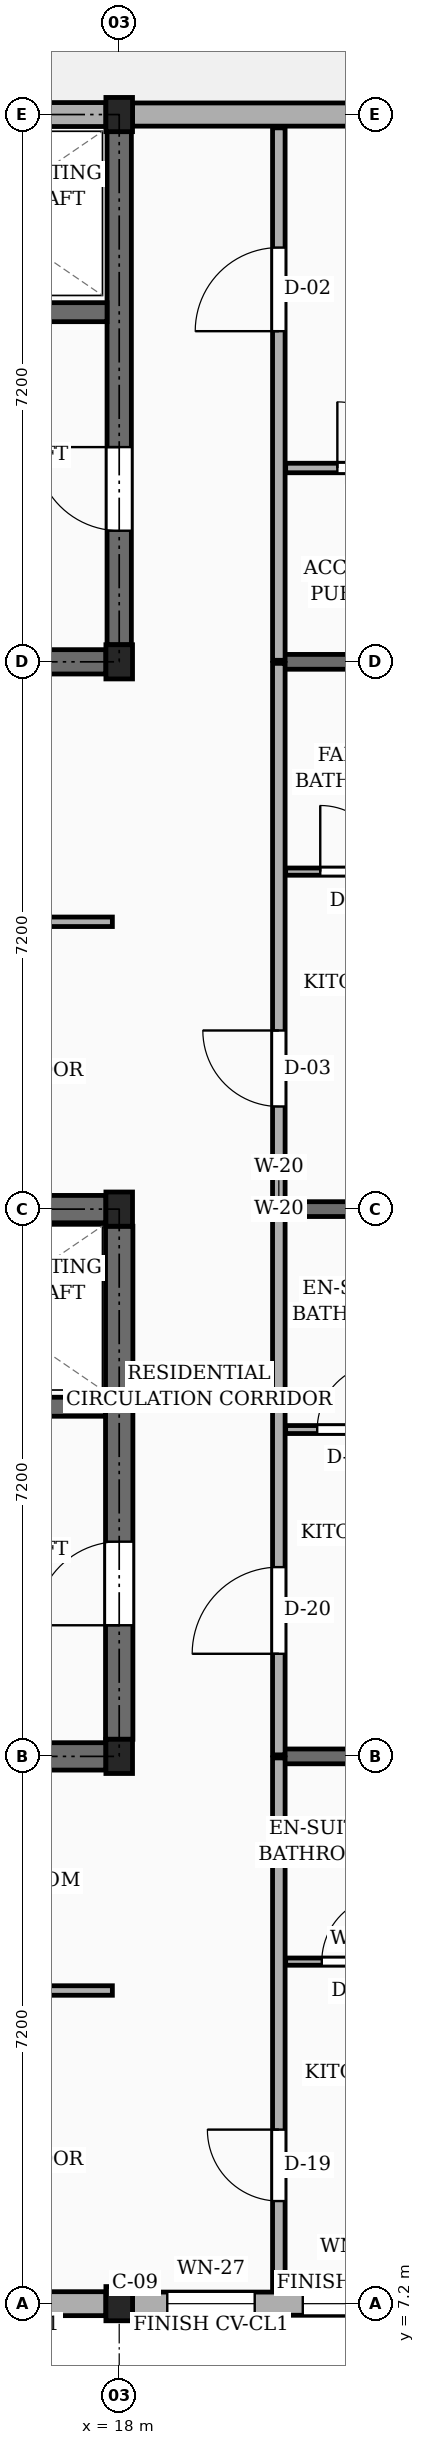
"""IFC4 building model, lengths in metres.
Left out: names, types, materials, properties, quantities, classifications, styles, units other than length and angle.
Written with IfcOpenShell. Run it as: python <this file> out.ifc"""

import sys

from ifc_helpers import new_model, si_unit, direction, frame, frame_2d, origin, origin_2d, place, context, subcontext, project, spatial, rectangle, extrude, element, fill, save


model = new_model("IFC4")
c1 = context("Model", 3, precision=1e-05, world=origin(), true_north=direction((0.0, 1.0)))
c2 = subcontext(c1, "Body", "Model", "MODEL_VIEW")
j1 = project(units=[si_unit("LENGTHUNIT", "METRE"), si_unit("PLANEANGLEUNIT", "RADIAN")], contexts=[c1])
p1 = place(None, origin())
s1 = spatial("IfcSite", under=j1, at=p1, CompositionType="ELEMENT")
p2 = place(p1, origin())
s2 = spatial("IfcBuilding", under=s1, at=p2, CompositionType="ELEMENT")
p3 = place(p2, frame((0.0, 0.0, 45.45)))
s3 = spatial("IfcBuildingStorey", under=s2, at=p3, CompositionType="ELEMENT", Elevation=45.45)
for number, where, z_axis, x_axis in (
    (1, (18.0, 7.2, 0.0), (0.0, 0.0, 1.0), (1.0, 0.0, 0.0)),
    (2, (18.0, 14.4, 0.0), (0.0, 0.0, 1.0), (1.0, 0.0, 0.0)),
    (3, (18.0, 21.6, 0.0), (0.0, 0.0, 1.0), (1.0, 0.0, 0.0)),
    (4, (18.0, 28.8, 0.0), (0.0, 0.0, 1.0), (1.0, 0.0, 0.0)),
    (5, (18.0, 36.0, 0.0), (0.0, 0.0, 1.0), (1.0, 0.0, 0.0)),
):
    element("IfcColumn", number, at=place(p3, frame(where, z_axis=z_axis, x_axis=x_axis)), inside=s3, PredefinedType="COLUMN", context=c2, shape_type="SweptSolid", body=[
        extrude(rectangle(XDim=0.35, YDim=0.45, at=origin_2d()), origin(), (0.0, 0.0, 1.0), 3.15),
    ])
for number, where, z_axis, x_axis in (
    (6, (20.1, 14.4, 0.0), (0.0, 0.0, 1.0), (1.0, 0.0, 0.0)),
    (7, (20.1, 21.6, 0.0), (0.0, 0.0, 1.0), (1.0, 0.0, 0.0)),
    (8, (20.1, 28.8, 0.0), (0.0, 0.0, 1.0), (1.0, 0.0, 0.0)),
):
    element("IfcWall", number, at=place(p3, frame(where, z_axis=z_axis, x_axis=x_axis)), inside=s3, PredefinedType="SOLIDWALL", context=c2, shape_type="SweptSolid", body=[
        extrude(rectangle(XDim=4.925, YDim=0.195, at=frame_2d((2.462, 0.0))), origin(), (0.0, 0.0, 1.0), 2.17),
    ])
p4 = place(p3, frame((10.975, 7.2, 0.0), z_axis=(0.0, 0.0, 1.0), x_axis=(1.0, 0.0, 0.0)))
e9 = element("IfcWall", 9, at=p4, inside=s3, PredefinedType="SOLIDWALL", context=c2, shape_type="SweptSolid", body=[
    extrude(rectangle(XDim=6.85, YDim=0.315, at=frame_2d((3.425, 0.0))), origin(), (0.0, 0.0, 1.0), 2.44),
])
p5 = place(p4, frame((0.45, 0.0, 0.78)))
e10 = element("IfcOpeningElement", 10, at=p5, cuts=e9, PredefinedType="OPENING", context=c2, shape_type="SweptSolid", body=[
    extrude(rectangle(XDim=0.94, YDim=1.44, at=frame_2d((0.47, 0.72))), frame((0.0, 0.167, 0.0), z_axis=(0.0, -1.0, 0.0), x_axis=(1.0, 0.0, 0.0)), (0.0, 0.0, 1.0), 0.335),
])
p6 = place(p4, frame((4.65, 0.0, 0.78)))
e11 = element("IfcOpeningElement", 11, at=p6, cuts=e9, PredefinedType="OPENING", context=c2, shape_type="SweptSolid", body=[
    extrude(rectangle(XDim=1.15, YDim=1.44, at=frame_2d((0.575, 0.72))), frame((0.0, 0.167, 0.0), z_axis=(0.0, -1.0, 0.0), x_axis=(1.0, 0.0, 0.0)), (0.0, 0.0, 1.0), 0.335),
])
p7 = place(p3, frame((18.175, 7.2, 0.0), z_axis=(0.0, 0.0, 1.0), x_axis=(1.0, 0.0, 0.0)))
e12 = element("IfcWall", 12, at=p7, inside=s3, PredefinedType="SOLIDWALL", context=c2, shape_type="SweptSolid", body=[
    extrude(rectangle(XDim=6.85, YDim=0.305, at=frame_2d((3.425, 0.0))), origin(), (0.0, 0.0, 1.0), 2.44),
])
p8 = place(p7, frame((0.458, 0.0, 0.78)))
e13 = element("IfcOpeningElement", 13, at=p8, cuts=e12, PredefinedType="OPENING", context=c2, shape_type="SweptSolid", body=[
    extrude(rectangle(XDim=1.15, YDim=1.44, at=frame_2d((0.575, 0.72))), frame((0.0, 0.163, 0.0), z_axis=(0.0, -1.0, 0.0), x_axis=(1.0, 0.0, 0.0)), (0.0, 0.0, 1.0), 0.325),
])
p9 = place(p7, frame((2.24, 0.0, 0.78)))
e14 = element("IfcOpeningElement", 14, at=p9, cuts=e12, PredefinedType="OPENING", context=c2, shape_type="SweptSolid", body=[
    extrude(rectangle(XDim=1.35, YDim=1.44, at=frame_2d((0.675, 0.72))), frame((0.0, 0.163, 0.0), z_axis=(0.0, -1.0, 0.0), x_axis=(1.0, 0.0, 0.0)), (0.0, 0.0, 1.0), 0.325),
])
p10 = place(p7, frame((4.883, 0.0, 0.78)))
e15 = element("IfcOpeningElement", 15, at=p10, cuts=e12, PredefinedType="OPENING", context=c2, shape_type="SweptSolid", body=[
    extrude(rectangle(XDim=0.85, YDim=1.15, at=frame_2d((0.425, 0.575))), frame((0.0, 0.163, 0.0), z_axis=(0.0, -1.0, 0.0), x_axis=(1.0, 0.0, 0.0)), (0.0, 0.0, 1.0), 0.325),
])
p11 = place(p3, frame((25.025, 36.0, 0.0), z_axis=(0.0, 0.0, 1.0), x_axis=(-1.0, 0.0, 0.0)))
e16 = element("IfcWall", 16, at=p11, inside=s3, PredefinedType="SOLIDWALL", context=c2, shape_type="SweptSolid", body=[
    extrude(rectangle(XDim=6.85, YDim=0.305, at=frame_2d((3.425, 0.0))), origin(), (0.0, 0.0, 1.0), 2.44),
])
p12 = place(p11, frame((2.8, 0.0, 0.0)))
e17 = element("IfcOpeningElement", 17, at=p12, cuts=e16, PredefinedType="OPENING", context=c2, shape_type="SweptSolid", body=[
    extrude(rectangle(XDim=1.2, YDim=2.12, at=frame_2d((0.6, 1.06))), frame((0.0, 0.163, 0.0), z_axis=(0.0, -1.0, 0.0), x_axis=(1.0, 0.0, 0.0)), (0.0, 0.0, 1.0), 0.325),
])
p13 = place(p11, frame((0.65, 0.0, 0.78)))
e18 = element("IfcOpeningElement", 18, at=p13, cuts=e16, PredefinedType="OPENING", context=c2, shape_type="SweptSolid", body=[
    extrude(rectangle(XDim=1.16, YDim=1.15, at=frame_2d((0.58, 0.575))), frame((0.0, 0.163, 0.0), z_axis=(0.0, -1.0, 0.0), x_axis=(1.0, 0.0, 0.0)), (0.0, 0.0, 1.0), 0.325),
])
p14 = place(p3, frame((17.825, 36.0, 0.0), z_axis=(0.0, 0.0, 1.0), x_axis=(-1.0, 0.0, 0.0)))
e19 = element("IfcWall", 19, at=p14, inside=s3, PredefinedType="SOLIDWALL", context=c2, shape_type="SweptSolid", body=[
    extrude(rectangle(XDim=6.85, YDim=0.315, at=frame_2d((3.425, 0.0))), origin(), (0.0, 0.0, 1.0), 2.44),
])
p15 = place(p14, frame((3.0, 0.0, 0.9)))
e20 = element("IfcOpeningElement", 20, at=p15, cuts=e19, PredefinedType="OPENING", context=c2, shape_type="SweptSolid", body=[
    extrude(rectangle(XDim=0.85, YDim=1.15, at=frame_2d((0.425, 0.575))), frame((0.0, 0.167, 0.0), z_axis=(0.0, -1.0, 0.0), x_axis=(1.0, 0.0, 0.0)), (0.0, 0.0, 1.0), 0.335),
])
p16 = place(p3, frame((10.975, 21.6, 0.0), z_axis=(0.0, 0.0, 1.0), x_axis=(1.0, 0.0, 0.0)))
e21 = element("IfcWall", 21, at=p16, inside=s3, PredefinedType="SHEAR", context=c2, shape_type="SweptSolid", body=[
    extrude(rectangle(XDim=6.85, YDim=0.36, at=frame_2d((3.425, 0.0))), origin(), (0.0, 0.0, 1.0), 2.87),
])
p17 = place(p3, frame((18.0, 14.625, 0.0), z_axis=(0.0, 0.0, 1.0), x_axis=(0.0, 1.0, 0.0)))
e22 = element("IfcWall", 22, at=p17, inside=s3, PredefinedType="SHEAR", context=c2, shape_type="SweptSolid", body=[
    extrude(rectangle(XDim=6.75, YDim=0.36, at=frame_2d((3.375, 0.0))), origin(), (0.0, 0.0, 1.0), 2.87),
])
p18 = place(p17, frame((1.5, 0.0, 0.0)))
e23 = element("IfcOpeningElement", 23, at=p18, cuts=e22, PredefinedType="OPENING", context=c2, shape_type="SweptSolid", body=[
    extrude(rectangle(XDim=1.1, YDim=2.15, at=frame_2d((0.55, 1.075))), frame((0.0, 0.19, 0.0), z_axis=(0.0, -1.0, 0.0), x_axis=(1.0, 0.0, 0.0)), (0.0, 0.0, 1.0), 0.38),
])
p19 = place(p3, frame((10.975, 14.4, 0.0), z_axis=(0.0, 0.0, 1.0), x_axis=(1.0, 0.0, 0.0)))
e24 = element("IfcWall", 24, at=p19, inside=s3, PredefinedType="SHEAR", context=c2, shape_type="SweptSolid", body=[
    extrude(rectangle(XDim=6.85, YDim=0.36, at=frame_2d((3.425, 0.0))), origin(), (0.0, 0.0, 1.0), 2.87),
])
p20 = place(p3, frame((14.525, 19.0, 0.0), z_axis=(0.0, 0.0, 1.0), x_axis=(1.0, 0.0, 0.0)))
e25 = element("IfcWall", 25, at=p20, inside=s3, PredefinedType="SHEAR", context=c2, shape_type="SweptSolid", body=[
    extrude(rectangle(XDim=3.295, YDim=0.25, at=frame_2d((1.647, 0.0))), origin(), (0.0, 0.0, 1.0), 2.87),
])
p21 = place(p20, frame((1.1, 0.0, 0.0)))
e26 = element("IfcOpeningElement", 26, at=p21, cuts=e25, PredefinedType="OPENING", context=c2, shape_type="SweptSolid", body=[
    extrude(rectangle(XDim=1.1, YDim=2.2, at=frame_2d((0.55, 1.1))), frame((0.0, 0.135, 0.0), z_axis=(0.0, -1.0, 0.0), x_axis=(1.0, 0.0, 0.0)), (0.0, 0.0, 1.0), 0.27),
])
p22 = place(p3, frame((18.0, 29.025, 0.0), z_axis=(0.0, 0.0, 1.0), x_axis=(0.0, 1.0, 0.0)))
e27 = element("IfcWall", 27, at=p22, inside=s3, PredefinedType="SHEAR", context=c2, shape_type="SweptSolid", body=[
    extrude(rectangle(XDim=6.75, YDim=0.32, at=frame_2d((3.375, 0.0))), origin(), (0.0, 0.0, 1.0), 2.87),
])
p23 = place(p22, frame((1.5, 0.0, 0.0)))
e28 = element("IfcOpeningElement", 28, at=p23, cuts=e27, PredefinedType="OPENING", context=c2, shape_type="SweptSolid", body=[
    extrude(rectangle(XDim=1.1, YDim=2.15, at=frame_2d((0.55, 1.075))), frame((0.0, 0.17, 0.0), z_axis=(0.0, -1.0, 0.0), x_axis=(1.0, 0.0, 0.0)), (0.0, 0.0, 1.0), 0.34),
])
p24 = place(p3, frame((10.975, 28.8, 0.0), z_axis=(0.0, 0.0, 1.0), x_axis=(1.0, 0.0, 0.0)))
e29 = element("IfcWall", 29, at=p24, inside=s3, PredefinedType="SHEAR", context=c2, shape_type="SweptSolid", body=[
    extrude(rectangle(XDim=6.85, YDim=0.32, at=frame_2d((3.425, 0.0))), origin(), (0.0, 0.0, 1.0), 2.87),
])
p25 = place(p3, frame((14.525, 33.4, 0.0), z_axis=(0.0, 0.0, 1.0), x_axis=(1.0, 0.0, 0.0)))
e30 = element("IfcWall", 30, at=p25, inside=s3, PredefinedType="SHEAR", context=c2, shape_type="SweptSolid", body=[
    extrude(rectangle(XDim=3.315, YDim=0.25, at=frame_2d((1.658, 0.0))), origin(), (0.0, 0.0, 1.0), 2.87),
])
p26 = place(p25, frame((1.1, 0.0, 0.0)))
e31 = element("IfcOpeningElement", 31, at=p26, cuts=e30, PredefinedType="OPENING", context=c2, shape_type="SweptSolid", body=[
    extrude(rectangle(XDim=1.1, YDim=2.2, at=frame_2d((0.55, 1.1))), frame((0.0, 0.135, 0.0), z_axis=(0.0, -1.0, 0.0), x_axis=(1.0, 0.0, 0.0)), (0.0, 0.0, 1.0), 0.27),
])
p27 = place(p3, frame((20.1, 7.375, 0.0), z_axis=(0.0, 0.0, 1.0), x_axis=(0.0, 1.0, 0.0)))
e32 = element("IfcWall", 32, at=p27, inside=s3, PredefinedType="PARTITIONING", context=c2, shape_type="SweptSolid", body=[
    extrude(rectangle(XDim=7.005, YDim=0.165, at=frame_2d((3.502, 0.0))), origin(), (0.0, 0.0, 1.0), 2.305),
])
p28 = place(p27, frame((1.175, 0.0, 0.0)))
e33 = element("IfcOpeningElement", 33, at=p28, cuts=e32, PredefinedType="OPENING", context=c2, shape_type="SweptSolid", body=[
    extrude(rectangle(XDim=0.94, YDim=2.12, at=frame_2d((0.47, 1.06))), frame((0.0, 0.093, 0.0), z_axis=(0.0, -1.0, 0.0), x_axis=(1.0, 0.0, 0.0)), (0.0, 0.0, 1.0), 0.185),
])
p29 = place(p3, frame((20.1, 14.42, 0.0), z_axis=(0.0, 0.0, 1.0), x_axis=(0.0, 1.0, 0.0)))
e34 = element("IfcWall", 34, at=p29, inside=s3, PredefinedType="PARTITIONING", context=c2, shape_type="SweptSolid", body=[
    extrude(rectangle(XDim=7.16, YDim=0.165, at=frame_2d((3.58, 0.0))), origin(), (0.0, 0.0, 1.0), 2.305),
])
p30 = place(p29, frame((1.33, 0.0, 0.0)))
e35 = element("IfcOpeningElement", 35, at=p30, cuts=e34, PredefinedType="OPENING", context=c2, shape_type="SweptSolid", body=[
    extrude(rectangle(XDim=1.14, YDim=2.18, at=frame_2d((0.57, 1.09))), frame((0.0, 0.093, 0.0), z_axis=(0.0, -1.0, 0.0), x_axis=(1.0, 0.0, 0.0)), (0.0, 0.0, 1.0), 0.185),
])
p31 = place(p3, frame((20.1, 21.62, 0.0), z_axis=(0.0, 0.0, 1.0), x_axis=(0.0, 1.0, 0.0)))
e36 = element("IfcWall", 36, at=p31, inside=s3, PredefinedType="PARTITIONING", context=c2, shape_type="SweptSolid", body=[
    extrude(rectangle(XDim=7.16, YDim=0.165, at=frame_2d((3.58, 0.0))), origin(), (0.0, 0.0, 1.0), 2.305),
])
p32 = place(p31, frame((1.33, 0.0, 0.0)))
e37 = element("IfcOpeningElement", 37, at=p32, cuts=e36, PredefinedType="OPENING", context=c2, shape_type="SweptSolid", body=[
    extrude(rectangle(XDim=1.0, YDim=2.15, at=frame_2d((0.5, 1.075))), frame((0.0, 0.093, 0.0), z_axis=(0.0, -1.0, 0.0), x_axis=(1.0, 0.0, 0.0)), (0.0, 0.0, 1.0), 0.185),
])
p33 = place(p3, frame((20.1, 28.82, 0.0), z_axis=(0.0, 0.0, 1.0), x_axis=(0.0, 1.0, 0.0)))
e38 = element("IfcWall", 38, at=p33, inside=s3, PredefinedType="PARTITIONING", context=c2, shape_type="SweptSolid", body=[
    extrude(rectangle(XDim=7.005, YDim=0.165, at=frame_2d((3.502, 0.0))), origin(), (0.0, 0.0, 1.0), 2.305),
])
p34 = place(p33, frame((4.33, 0.0, 0.0)))
e39 = element("IfcOpeningElement", 39, at=p34, cuts=e38, PredefinedType="OPENING", context=c2, shape_type="SweptSolid", body=[
    extrude(rectangle(XDim=1.1, YDim=2.15, at=frame_2d((0.55, 1.075))), frame((0.0, 0.093, 0.0), z_axis=(0.0, -1.0, 0.0), x_axis=(1.0, 0.0, 0.0)), (0.0, 0.0, 1.0), 0.185),
])
p35 = place(p3, frame((10.89, 11.32, 0.0), z_axis=(0.0, 0.0, 1.0), x_axis=(1.0, 0.0, 0.0)))
e40 = element("IfcWall", 40, at=p35, inside=s3, PredefinedType="PARTITIONING", context=c2, shape_type="SweptSolid", body=[
    extrude(rectangle(XDim=7.02, YDim=0.125, at=frame_2d((3.51, 0.0))), origin(), (0.0, 0.0, 1.0), 2.305),
])
p36 = place(p35, frame((2.85, 0.0, 0.0)))
e41 = element("IfcOpeningElement", 41, at=p36, cuts=e40, PredefinedType="OPENING", context=c2, shape_type="SweptSolid", body=[
    extrude(rectangle(XDim=1.02, YDim=2.15, at=frame_2d((0.51, 1.075))), frame((0.0, 0.073, 0.0), z_axis=(0.0, -1.0, 0.0), x_axis=(1.0, 0.0, 0.0)), (0.0, 0.0, 1.0), 0.145),
])
p37 = place(p3, frame((20.19, 11.7, 0.0), z_axis=(0.0, 0.0, 1.0), x_axis=(1.0, 0.0, 0.0)))
e42 = element("IfcWall", 42, at=p37, inside=s3, PredefinedType="PARTITIONING", context=c2, shape_type="SweptSolid", body=[
    extrude(rectangle(XDim=1.82, YDim=0.095, at=frame_2d((0.91, 0.0))), origin(), (0.0, 0.0, 1.0), 2.305),
])
p38 = place(p37, frame((0.475, 0.0, 0.0)))
e43 = element("IfcOpeningElement", 43, at=p38, cuts=e42, PredefinedType="OPENING", context=c2, shape_type="SweptSolid", body=[
    extrude(rectangle(XDim=0.87, YDim=2.05, at=frame_2d((0.435, 1.025))), frame((0.0, 0.058, 0.0), z_axis=(0.0, -1.0, 0.0), x_axis=(1.0, 0.0, 0.0)), (0.0, 0.0, 1.0), 0.115),
])
p39 = place(p3, frame((20.19, 18.7, 0.0), z_axis=(0.0, 0.0, 1.0), x_axis=(1.0, 0.0, 0.0)))
e44 = element("IfcWall", 44, at=p39, inside=s3, PredefinedType="PARTITIONING", context=c2, shape_type="SweptSolid", body=[
    extrude(rectangle(XDim=1.7, YDim=0.105, at=frame_2d((0.85, 0.0))), origin(), (0.0, 0.0, 1.0), 2.305),
])
p40 = place(p39, frame((0.415, 0.0, 0.0)))
e45 = element("IfcOpeningElement", 45, at=p40, cuts=e44, PredefinedType="OPENING", context=c2, shape_type="SweptSolid", body=[
    extrude(rectangle(XDim=0.87, YDim=2.05, at=frame_2d((0.435, 1.025))), frame((0.0, 0.062, 0.0), z_axis=(0.0, -1.0, 0.0), x_axis=(1.0, 0.0, 0.0)), (0.0, 0.0, 1.0), 0.125),
])
p41 = place(p3, frame((10.89, 25.38, 0.0), z_axis=(0.0, 0.0, 1.0), x_axis=(1.0, 0.0, 0.0)))
e46 = element("IfcWall", 46, at=p41, inside=s3, PredefinedType="PARTITIONING", context=c2, shape_type="SweptSolid", body=[
    extrude(rectangle(XDim=7.02, YDim=0.125, at=frame_2d((3.51, 0.0))), origin(), (0.0, 0.0, 1.0), 2.305),
])
p42 = place(p41, frame((2.85, 0.0, 0.0)))
e47 = element("IfcOpeningElement", 47, at=p42, cuts=e46, PredefinedType="OPENING", context=c2, shape_type="SweptSolid", body=[
    extrude(rectangle(XDim=1.02, YDim=2.15, at=frame_2d((0.51, 1.075))), frame((0.0, 0.073, 0.0), z_axis=(0.0, -1.0, 0.0), x_axis=(1.0, 0.0, 0.0)), (0.0, 0.0, 1.0), 0.145),
])
p43 = place(p3, frame((20.19, 26.04, 0.0), z_axis=(0.0, 0.0, 1.0), x_axis=(1.0, 0.0, 0.0)))
e48 = element("IfcWall", 48, at=p43, inside=s3, PredefinedType="PARTITIONING", context=c2, shape_type="SweptSolid", body=[
    extrude(rectangle(XDim=1.78, YDim=0.095, at=frame_2d((0.89, 0.0))), origin(), (0.0, 0.0, 1.0), 2.305),
])
p44 = place(p43, frame((0.455, 0.0, 0.0)))
e49 = element("IfcOpeningElement", 49, at=p44, cuts=e48, PredefinedType="OPENING", context=c2, shape_type="SweptSolid", body=[
    extrude(rectangle(XDim=0.87, YDim=2.05, at=frame_2d((0.435, 1.025))), frame((0.0, 0.058, 0.0), z_axis=(0.0, -1.0, 0.0), x_axis=(1.0, 0.0, 0.0)), (0.0, 0.0, 1.0), 0.115),
])
p45 = place(p3, frame((20.19, 31.35, 0.0), z_axis=(0.0, 0.0, 1.0), x_axis=(1.0, 0.0, 0.0)))
e50 = element("IfcWall", 50, at=p45, inside=s3, PredefinedType="PARTITIONING", context=c2, shape_type="SweptSolid", body=[
    extrude(rectangle(XDim=2.21, YDim=0.125, at=frame_2d((1.105, 0.0))), origin(), (0.0, 0.0, 1.0), 2.305),
])
p46 = place(p45, frame((0.68, 0.0, 0.0)))
e51 = element("IfcOpeningElement", 51, at=p46, cuts=e50, PredefinedType="OPENING", context=c2, shape_type="SweptSolid", body=[
    extrude(rectangle(XDim=0.87, YDim=2.05, at=frame_2d((0.435, 1.025))), frame((0.0, 0.073, 0.0), z_axis=(0.0, -1.0, 0.0), x_axis=(1.0, 0.0, 0.0)), (0.0, 0.0, 1.0), 0.145),
])
p47 = place(p8, origin())
e52 = element("IfcWindow", 52, at=p47, inside=s3, PartitioningType="SINGLE_PANEL", PredefinedType="WINDOW", context=c2, shape_type="SweptSolid", body=[
    extrude(rectangle(XDim=1.15, YDim=1.44, at=frame_2d((0.575, 0.72))), frame((0.0, 0.03, 0.0), z_axis=(0.0, -1.0, 0.0), x_axis=(1.0, 0.0, 0.0)), (0.0, 0.0, 1.0), 0.06),
])
fill(e13, e52)
p48 = place(p9, origin())
e53 = element("IfcWindow", 53, at=p48, inside=s3, PartitioningType="SINGLE_PANEL", PredefinedType="WINDOW", context=c2, shape_type="SweptSolid", body=[
    extrude(rectangle(XDim=1.35, YDim=1.44, at=frame_2d((0.675, 0.72))), frame((0.0, 0.03, 0.0), z_axis=(0.0, -1.0, 0.0), x_axis=(1.0, 0.0, 0.0)), (0.0, 0.0, 1.0), 0.06),
])
fill(e14, e53)
p49 = place(p18, frame((1.1, 0.0, 0.0), z_axis=(0.0, 0.0, 1.0), x_axis=(-1.0, 0.0, 0.0)))
e54 = element("IfcDoor", 54, at=p49, inside=s3, OperationType="SINGLE_SWING_LEFT", PredefinedType="DOOR", context=c2, shape_type="SweptSolid", body=[
    extrude(rectangle(XDim=1.1, YDim=2.15, at=frame_2d((0.55, 1.075))), frame((0.0, 0.025, 0.0), z_axis=(0.0, -1.0, 0.0), x_axis=(1.0, 0.0, 0.0)), (0.0, 0.0, 1.0), 0.05),
])
fill(e23, e54)
p50 = place(p23, frame((1.1, 0.0, 0.0), z_axis=(0.0, 0.0, 1.0), x_axis=(-1.0, 0.0, 0.0)))
e55 = element("IfcDoor", 55, at=p50, inside=s3, OperationType="SINGLE_SWING_RIGHT", PredefinedType="DOOR", context=c2, shape_type="SweptSolid", body=[
    extrude(rectangle(XDim=1.1, YDim=2.15, at=frame_2d((0.55, 1.075))), frame((0.0, 0.025, 0.0), z_axis=(0.0, -1.0, 0.0), x_axis=(1.0, 0.0, 0.0)), (0.0, 0.0, 1.0), 0.05),
])
fill(e28, e55)
p51 = place(p28, origin())
e56 = element("IfcDoor", 56, at=p51, inside=s3, OperationType="SINGLE_SWING_RIGHT", PredefinedType="DOOR", context=c2, shape_type="SweptSolid", body=[
    extrude(rectangle(XDim=0.94, YDim=2.12, at=frame_2d((0.47, 1.06))), frame((0.0, 0.025, 0.0), z_axis=(0.0, -1.0, 0.0), x_axis=(1.0, 0.0, 0.0)), (0.0, 0.0, 1.0), 0.05),
])
fill(e33, e56)
p52 = place(p30, origin())
e57 = element("IfcDoor", 57, at=p52, inside=s3, OperationType="SINGLE_SWING_LEFT", PredefinedType="DOOR", context=c2, shape_type="SweptSolid", body=[
    extrude(rectangle(XDim=1.14, YDim=2.18, at=frame_2d((0.57, 1.09))), frame((0.0, 0.025, 0.0), z_axis=(0.0, -1.0, 0.0), x_axis=(1.0, 0.0, 0.0)), (0.0, 0.0, 1.0), 0.05),
])
fill(e35, e57)
p53 = place(p32, origin())
e58 = element("IfcDoor", 58, at=p53, inside=s3, OperationType="SINGLE_SWING_RIGHT", PredefinedType="DOOR", context=c2, shape_type="SweptSolid", body=[
    extrude(rectangle(XDim=1.0, YDim=2.15, at=frame_2d((0.5, 1.075))), frame((0.0, 0.025, 0.0), z_axis=(0.0, -1.0, 0.0), x_axis=(1.0, 0.0, 0.0)), (0.0, 0.0, 1.0), 0.05),
])
fill(e37, e58)
p54 = place(p34, origin())
e59 = element("IfcDoor", 59, at=p54, inside=s3, OperationType="SINGLE_SWING_LEFT", PredefinedType="DOOR", context=c2, shape_type="SweptSolid", body=[
    extrude(rectangle(XDim=1.1, YDim=2.15, at=frame_2d((0.55, 1.075))), frame((0.0, 0.025, 0.0), z_axis=(0.0, -1.0, 0.0), x_axis=(1.0, 0.0, 0.0)), (0.0, 0.0, 1.0), 0.05),
])
fill(e39, e59)
p55 = place(p38, origin())
e60 = element("IfcDoor", 60, at=p55, inside=s3, OperationType="SINGLE_SWING_RIGHT", PredefinedType="DOOR", context=c2, shape_type="SweptSolid", body=[
    extrude(rectangle(XDim=0.87, YDim=2.05, at=frame_2d((0.435, 1.025))), frame((0.0, 0.025, 0.0), z_axis=(0.0, -1.0, 0.0), x_axis=(1.0, 0.0, 0.0)), (0.0, 0.0, 1.0), 0.05),
])
fill(e43, e60)
p56 = place(p40, origin())
e61 = element("IfcDoor", 61, at=p56, inside=s3, OperationType="SINGLE_SWING_RIGHT", PredefinedType="DOOR", context=c2, shape_type="SweptSolid", body=[
    extrude(rectangle(XDim=0.87, YDim=2.05, at=frame_2d((0.435, 1.025))), frame((0.0, 0.025, 0.0), z_axis=(0.0, -1.0, 0.0), x_axis=(1.0, 0.0, 0.0)), (0.0, 0.0, 1.0), 0.05),
])
fill(e45, e61)
p57 = place(p44, origin())
e62 = element("IfcDoor", 62, at=p57, inside=s3, OperationType="SINGLE_SWING_LEFT", PredefinedType="DOOR", context=c2, shape_type="SweptSolid", body=[
    extrude(rectangle(XDim=0.87, YDim=2.05, at=frame_2d((0.435, 1.025))), frame((0.0, 0.025, 0.0), z_axis=(0.0, -1.0, 0.0), x_axis=(1.0, 0.0, 0.0)), (0.0, 0.0, 1.0), 0.05),
])
fill(e49, e62)
p58 = place(p46, origin())
e63 = element("IfcDoor", 63, at=p58, inside=s3, OperationType="SINGLE_SWING_LEFT", PredefinedType="DOOR", context=c2, shape_type="SweptSolid", body=[
    extrude(rectangle(XDim=0.87, YDim=2.05, at=frame_2d((0.435, 1.025))), frame((0.0, 0.025, 0.0), z_axis=(0.0, -1.0, 0.0), x_axis=(1.0, 0.0, 0.0)), (0.0, 0.0, 1.0), 0.05),
])
fill(e51, e63)
save(model, sys.argv[1])
